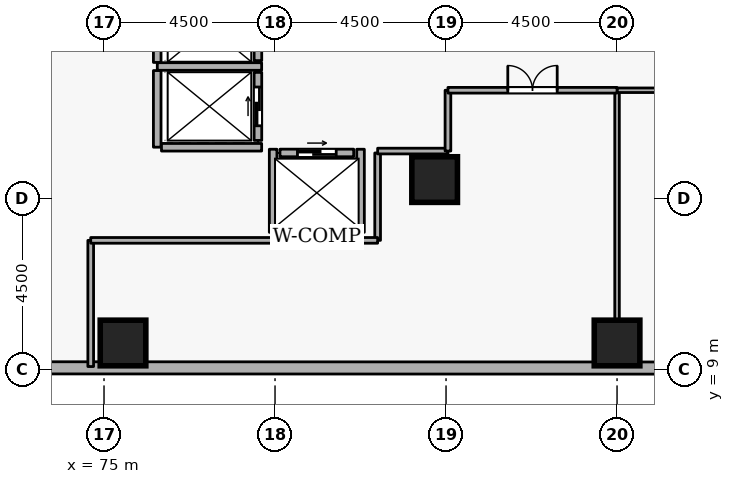
"""IFC4 building model, lengths in metres.
Left out: names, types, materials, properties, quantities, classifications, styles, units other than length and angle.
Written with IfcOpenShell. Run it as: python <this file> out.ifc"""

import sys

from ifc_helpers import new_model, si_unit, direction, frame, frame_2d, origin, origin_2d, place, context, subcontext, project, spatial, rectangle, extrude, element, fill, save


model = new_model("IFC4")
c1 = context("Model", 3, precision=1e-05, world=origin(), true_north=direction((0.0, 1.0)))
c2 = subcontext(c1, "Body", "Model", "MODEL_VIEW")
j1 = project(units=[si_unit("LENGTHUNIT", "METRE"), si_unit("PLANEANGLEUNIT", "RADIAN")], contexts=[c1])
p1 = place(None, origin())
s1 = spatial("IfcSite", under=j1, at=p1, CompositionType="ELEMENT")
p2 = place(p1, origin())
s2 = spatial("IfcBuilding", under=s1, at=p2, CompositionType="ELEMENT")
p3 = place(p2, frame((0.0, 0.0, 75.9)))
s3 = spatial("IfcBuildingStorey", under=s2, at=p3, CompositionType="ELEMENT", Elevation=75.9)
for number, where, z_axis, x_axis in (
    (1, (88.5, 9.7, 0.0), (0.0, 0.0, 1.0), (1.0, 0.0, 0.0)),
    (2, (75.5, 9.7, 0.0), (0.0, 0.0, 1.0), (1.0, 0.0, 0.0)),
    (3, (83.7, 14.0, 0.0), (0.0, 0.0, 1.0), (1.0, 0.0, 0.0)),
):
    element("IfcColumn", number, at=place(p3, frame(where, z_axis=z_axis, x_axis=x_axis)), inside=s3, PredefinedType="COLUMN", context=c2, shape_type="SweptSolid", body=[
        extrude(rectangle(XDim=1.2, YDim=1.2, at=origin_2d()), origin(), (0.0, 0.0, 1.0), 4.2),
    ])
p4 = place(p3, frame((70.704, 9.047, 0.0), z_axis=(0.0, 0.0, 1.0), x_axis=(0.99999993762, -0.000353213856, 0.0)))
e4 = element("IfcWall", 4, at=p4, inside=s3, PredefinedType="STANDARD", context=c2, shape_type="SweptSolid", body=[
    extrude(rectangle(XDim=33.177, YDim=0.32, at=frame_2d((16.589, 0.0))), origin(), (0.0, 0.0, 1.0), 3.3),
])
p5 = place(p3, frame((79.05, 17.13, 0.0), z_axis=(0.0, 0.0, 1.0), x_axis=(0.0, 1.0, 0.0)))
e5 = element("IfcWall", 5, at=p5, inside=s3, PredefinedType="STANDARD", context=c2, shape_type="SweptSolid", body=[
    extrude(rectangle(XDim=1.74, YDim=0.2, at=frame_2d((0.87, 0.0))), origin(), (0.0, 0.0, 1.0), 3.94),
])
p6 = place(p5, frame((0.36, 0.0, 0.0)))
e6 = element("IfcOpeningElement", 6, at=p6, cuts=e5, PredefinedType="OPENING", context=c2, shape_type="SweptSolid", body=[
    extrude(rectangle(XDim=1.02, YDim=2.06, at=frame_2d((0.51, 1.03))), frame((0.0, 0.11, 0.0), z_axis=(0.0, -1.0, 0.0), x_axis=(1.0, 0.0, 0.0)), (0.0, 0.0, 1.0), 0.22),
])
p7 = place(p3, frame((79.05, 15.03, 0.0), z_axis=(0.0, 0.0, 1.0), x_axis=(0.0, 1.0, 0.0)))
e7 = element("IfcWall", 7, at=p7, inside=s3, PredefinedType="STANDARD", context=c2, shape_type="SweptSolid", body=[
    extrude(rectangle(XDim=1.79, YDim=0.2, at=frame_2d((0.895, 0.0))), origin(), (0.0, 0.0, 1.0), 3.94),
])
p8 = place(p7, frame((0.385, 0.0, 0.0)))
e8 = element("IfcOpeningElement", 8, at=p8, cuts=e7, PredefinedType="OPENING", context=c2, shape_type="SweptSolid", body=[
    extrude(rectangle(XDim=1.02, YDim=2.06, at=frame_2d((0.51, 1.03))), frame((0.0, 0.11, 0.0), z_axis=(0.0, -1.0, 0.0), x_axis=(1.0, 0.0, 0.0)), (0.0, 0.0, 1.0), 0.22),
])
p9 = place(p3, frame((79.63, 14.7, 0.0), z_axis=(0.0, 0.0, 1.0), x_axis=(1.0, 0.0, 0.0)))
e9 = element("IfcWall", 9, at=p9, inside=s3, PredefinedType="STANDARD", context=c2, shape_type="SweptSolid", body=[
    extrude(rectangle(XDim=1.94, YDim=0.2, at=frame_2d((0.97, 0.0))), origin(), (0.0, 0.0, 1.0), 3.94),
])
p10 = place(p9, frame((0.46, 0.0, 0.0)))
e10 = element("IfcOpeningElement", 10, at=p10, cuts=e9, PredefinedType="OPENING", context=c2, shape_type="SweptSolid", body=[
    extrude(rectangle(XDim=1.02, YDim=2.06, at=frame_2d((0.51, 1.03))), frame((0.0, 0.11, 0.0), z_axis=(0.0, -1.0, 0.0), x_axis=(1.0, 0.0, 0.0)), (0.0, 0.0, 1.0), 0.22),
])
p11 = place(p3, frame((76.402, 16.975, 0.0), z_axis=(0.0, 0.0, 1.0), x_axis=(1.0, 0.0, 0.0)))
e11 = element("IfcWall", 11, at=p11, inside=s3, PredefinedType="STANDARD", context=c2, shape_type="SweptSolid", body=[
    extrude(rectangle(XDim=2.746, YDim=0.2, at=frame_2d((1.373, 0.0))), origin(), (0.0, 0.0, 1.0), 3.94),
])
p12 = place(p3, frame((76.4, 14.852, 0.0), z_axis=(0.0, 0.0, 1.0), x_axis=(0.0, 1.0, 0.0)))
e12 = element("IfcWall", 12, at=p12, inside=s3, PredefinedType="STANDARD", context=c2, shape_type="SweptSolid", body=[
    extrude(rectangle(XDim=2.016, YDim=0.2, at=frame_2d((1.008, 0.0))), origin(), (0.0, 0.0, 1.0), 3.94),
])
p13 = place(p3, frame((76.4, 17.082, 0.0), z_axis=(0.0, 0.0, 1.0), x_axis=(0.0, 1.0, 0.0)))
e13 = element("IfcWall", 13, at=p13, inside=s3, PredefinedType="STANDARD", context=c2, shape_type="SweptSolid", body=[
    extrude(rectangle(XDim=1.856, YDim=0.2, at=frame_2d((0.928, 0.0))), origin(), (0.0, 0.0, 1.0), 3.94),
])
p14 = place(p3, frame((76.512, 14.85, 0.0), z_axis=(0.0, 0.0, 1.0), x_axis=(1.0, 0.0, 0.0)))
e14 = element("IfcWall", 14, at=p14, inside=s3, PredefinedType="STANDARD", context=c2, shape_type="SweptSolid", body=[
    extrude(rectangle(XDim=2.636, YDim=0.2, at=frame_2d((1.318, 0.0))), origin(), (0.0, 0.0, 1.0), 3.94),
])
p15 = place(p3, frame((79.452, 12.5, 0.0), z_axis=(0.0, 0.0, 1.0), x_axis=(1.0, 0.0, 0.0)))
e15 = element("IfcWall", 15, at=p15, inside=s3, PredefinedType="STANDARD", context=c2, shape_type="SweptSolid", body=[
    extrude(rectangle(XDim=2.296, YDim=0.2, at=frame_2d((1.148, 0.0))), origin(), (0.0, 0.0, 1.0), 3.94),
])
for number, where, z_axis, x_axis in (
    (16, (81.75, 12.612, 0.0), (0.0, 0.0, 1.0), (0.0, 1.0, 0.0)),
    (17, (79.45, 12.612, 0.0), (0.0, 0.0, 1.0), (0.0, 1.0, 0.0)),
):
    element("IfcWall", number, at=place(p3, frame(where, z_axis=z_axis, x_axis=x_axis)), inside=s3, PredefinedType="STANDARD", context=c2, shape_type="SweptSolid", body=[
        extrude(rectangle(XDim=2.186, YDim=0.2, at=frame_2d((1.093, 0.0))), origin(), (0.0, 0.0, 1.0), 3.94),
    ])
p16 = place(p3, frame((88.5, 9.08, 0.0), z_axis=(0.0, 0.0, 1.0), x_axis=(0.0, 1.0, 0.0)))
e18 = element("IfcWall", 18, at=p16, inside=s3, PredefinedType="PARTITIONING", context=c2, shape_type="SweptSolid", body=[
    extrude(rectangle(XDim=7.27, YDim=0.12, at=frame_2d((3.635, 0.0))), origin(), (0.0, 0.0, 1.0), 3.482),
])
p17 = place(p3, frame((88.5, 16.35, 0.0), z_axis=(0.0, 0.0, 1.0), x_axis=(1.0, 0.0, 0.0)))
e19 = element("IfcWall", 19, at=p17, inside=s3, PredefinedType="PARTITIONING", context=c2, shape_type="SweptSolid", body=[
    extrude(rectangle(XDim=4.45, YDim=0.12, at=frame_2d((2.225, 0.0))), origin(), (0.0, 0.0, 1.0), 3.94),
])
p18 = place(p17, frame((1.7, 0.0, 0.0)))
e20 = element("IfcOpeningElement", 20, at=p18, cuts=e19, PredefinedType="OPENING", context=c2, shape_type="SweptSolid", body=[
    extrude(rectangle(XDim=1.05, YDim=2.1, at=frame_2d((0.525, 1.05))), frame((0.0, 0.07, 0.0), z_axis=(0.0, -1.0, 0.0), x_axis=(1.0, 0.0, 0.0)), (0.0, 0.0, 1.0), 0.14),
])
p19 = place(p3, frame((82.2, 12.4, 0.0), z_axis=(0.0, 0.0, 1.0), x_axis=(0.0, 1.0, 0.0)))
e21 = element("IfcWall", 21, at=p19, inside=s3, PredefinedType="PARTITIONING", context=c2, shape_type="SweptSolid", body=[
    extrude(rectangle(XDim=2.3, YDim=0.15, at=frame_2d((1.15, 0.0))), origin(), (0.0, 0.0, 1.0), 3.94),
])
p20 = place(p3, frame((82.2, 14.75, 0.0), z_axis=(0.0, 0.0, 1.0), x_axis=(1.0, 0.0, 0.0)))
e22 = element("IfcWall", 22, at=p20, inside=s3, PredefinedType="PARTITIONING", context=c2, shape_type="SweptSolid", body=[
    extrude(rectangle(XDim=1.85, YDim=0.15, at=frame_2d((0.925, 0.0))), origin(), (0.0, 0.0, 1.0), 3.94),
])
p21 = place(p3, frame((84.05, 14.75, 0.0), z_axis=(0.0, 0.0, 1.0), x_axis=(0.0, 1.0, 0.0)))
e23 = element("IfcWall", 23, at=p21, inside=s3, PredefinedType="PARTITIONING", context=c2, shape_type="SweptSolid", body=[
    extrude(rectangle(XDim=1.6, YDim=0.15, at=frame_2d((0.8, 0.0))), origin(), (0.0, 0.0, 1.0), 3.94),
])
p22 = place(p3, frame((84.05, 16.35, 0.0), z_axis=(0.0, 0.0, 1.0), x_axis=(1.0, 0.0, 0.0)))
e24 = element("IfcWall", 24, at=p22, inside=s3, PredefinedType="PARTITIONING", context=c2, shape_type="SweptSolid", body=[
    extrude(rectangle(XDim=4.45, YDim=0.15, at=frame_2d((2.225, 0.0))), origin(), (0.0, 0.0, 1.0), 3.94),
])
p23 = place(p22, frame((1.575, 0.0, 0.0)))
e25 = element("IfcOpeningElement", 25, at=p23, cuts=e24, PredefinedType="OPENING", context=c2, shape_type="SweptSolid", body=[
    extrude(rectangle(XDim=1.3, YDim=2.12, at=frame_2d((0.65, 1.06))), frame((0.0, 0.085, 0.0), z_axis=(0.0, -1.0, 0.0), x_axis=(1.0, 0.0, 0.0)), (0.0, 0.0, 1.0), 0.17),
])
p24 = place(p3, frame((74.65, 9.08, 0.0), z_axis=(0.0, 0.0, 1.0), x_axis=(0.0, 1.0, 0.0)))
e26 = element("IfcWall", 26, at=p24, inside=s3, PredefinedType="PARTITIONING", context=c2, shape_type="SweptSolid", body=[
    extrude(rectangle(XDim=3.32, YDim=0.15, at=frame_2d((1.66, 0.0))), origin(), (0.0, 0.0, 1.0), 3.94),
])
p25 = place(p3, frame((74.65, 12.4, 0.0), z_axis=(0.0, 0.0, 1.0), x_axis=(1.0, 0.0, 0.0)))
e27 = element("IfcWall", 27, at=p25, inside=s3, PredefinedType="PARTITIONING", context=c2, shape_type="SweptSolid", body=[
    extrude(rectangle(XDim=4.802, YDim=0.15, at=frame_2d((2.401, 0.0))), origin(), (0.0, 0.0, 1.0), 3.94),
])
p26 = place(p3, frame((81.748, 12.4, 0.0), z_axis=(0.0, 0.0, 1.0), x_axis=(1.0, 0.0, 0.0)))
e28 = element("IfcWall", 28, at=p26, inside=s3, PredefinedType="PARTITIONING", context=c2, shape_type="SweptSolid", body=[
    extrude(rectangle(XDim=0.452, YDim=0.15, at=frame_2d((0.226, 0.0))), origin(), (0.0, 0.0, 1.0), 3.94),
])
p27 = place(p8, origin())
e29 = element("IfcDoor", 29, at=p27, inside=s3, OperationType="SLIDING_TO_LEFT", PredefinedType="DOOR", context=c2, shape_type="SweptSolid", body=[
    extrude(rectangle(XDim=1.02, YDim=2.06, at=frame_2d((0.51, 1.03))), frame((0.0, 0.025, 0.0), z_axis=(0.0, -1.0, 0.0), x_axis=(1.0, 0.0, 0.0)), (0.0, 0.0, 1.0), 0.05),
])
fill(e8, e29)
p28 = place(p10, origin())
e30 = element("IfcDoor", 30, at=p28, inside=s3, OperationType="SLIDING_TO_LEFT", PredefinedType="DOOR", context=c2, shape_type="SweptSolid", body=[
    extrude(rectangle(XDim=1.02, YDim=2.06, at=frame_2d((0.51, 1.03))), frame((0.0, 0.025, 0.0), z_axis=(0.0, -1.0, 0.0), x_axis=(1.0, 0.0, 0.0)), (0.0, 0.0, 1.0), 0.05),
])
fill(e10, e30)
p29 = place(p23, origin())
e31 = element("IfcDoor", 31, at=p29, inside=s3, OperationType="DOUBLE_DOOR_SINGLE_SWING", PredefinedType="DOOR", context=c2, shape_type="SweptSolid", body=[
    extrude(rectangle(XDim=1.3, YDim=2.12, at=frame_2d((0.65, 1.06))), frame((0.0, 0.025, 0.0), z_axis=(0.0, -1.0, 0.0), x_axis=(1.0, 0.0, 0.0)), (0.0, 0.0, 1.0), 0.05),
])
fill(e25, e31)
save(model, sys.argv[1])
